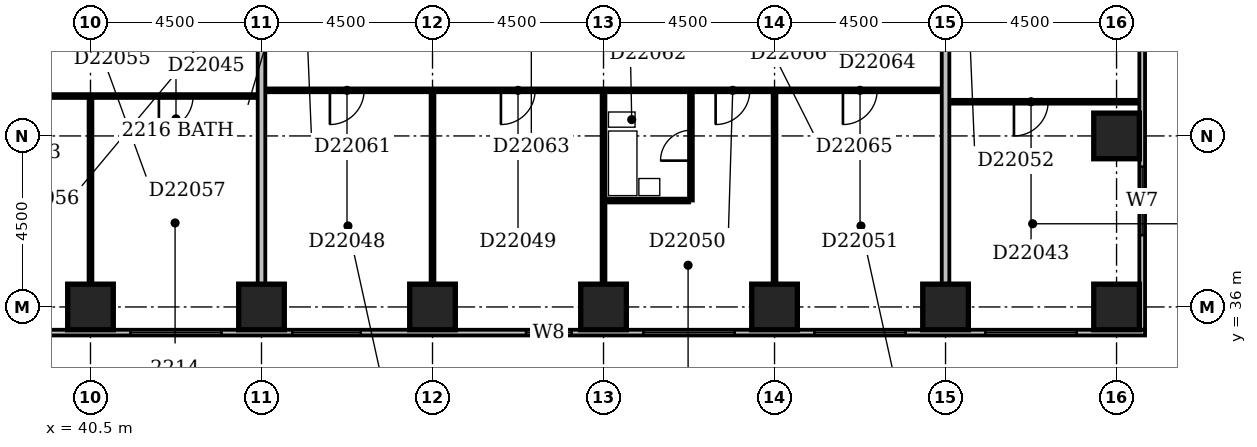
"""IFC4 building model, lengths in metres.
Left out: names, types, materials, properties, quantities, classifications, styles, units other than length and angle.
Written with IfcOpenShell. Run it as: python <this file> out.ifc"""

import sys

from ifc_helpers import new_model, si_unit, direction, frame, frame_2d, origin, origin_2d, place, context, subcontext, project, spatial, rectangle, extrude, element, fill, save


model = new_model("IFC4")
c1 = context("Model", 3, precision=1e-05, world=origin(), true_north=direction((0.0, 1.0)))
c2 = subcontext(c1, "Body", "Model", "MODEL_VIEW")
j1 = project(units=[si_unit("LENGTHUNIT", "METRE"), si_unit("PLANEANGLEUNIT", "RADIAN")], contexts=[c1])
p1 = place(None, origin())
s1 = spatial("IfcSite", under=j1, at=p1, CompositionType="ELEMENT")
p2 = place(p1, origin())
s2 = spatial("IfcBuilding", under=s1, at=p2, CompositionType="ELEMENT")
p3 = place(p2, frame((0.0, 0.0, 90.2)))
s3 = spatial("IfcBuildingStorey", under=s2, at=p3, CompositionType="ELEMENT", Elevation=90.2)
for number, where, z_axis, x_axis in (
    (1, (40.5, 36.0, -0.3), (0.0, 0.0, 1.0), (1.0, 0.0, 0.0)),
    (2, (45.0, 36.0, -0.3), (0.0, 0.0, 1.0), (1.0, 0.0, 0.0)),
    (3, (49.5, 36.0, -0.3), (0.0, 0.0, 1.0), (1.0, 0.0, 0.0)),
    (4, (54.0, 36.0, -0.3), (0.0, 0.0, 1.0), (1.0, 0.0, 0.0)),
    (5, (58.5, 36.0, -0.3), (0.0, 0.0, 1.0), (1.0, 0.0, 0.0)),
    (6, (63.0, 36.0, -0.3), (0.0, 0.0, 1.0), (1.0, 0.0, 0.0)),
    (7, (67.5, 36.0, -0.3), (0.0, 0.0, 1.0), (1.0, 0.0, 0.0)),
    (8, (67.5, 40.5, -0.3), (0.0, 0.0, 1.0), (1.0, 0.0, 0.0)),
):
    element("IfcColumn", number, at=place(p3, frame(where, z_axis=z_axis, x_axis=x_axis)), inside=s3, PredefinedType="COLUMN", context=c2, shape_type="SweptSolid", body=[
        extrude(rectangle(XDim=1.2, YDim=1.2, at=origin_2d()), origin(), (0.0, 0.0, 1.0), 3.6),
    ])
p4 = place(p3, frame((23.1, 35.325, 0.0), z_axis=(0.0, 0.0, 1.0), x_axis=(1.0, 0.0, 0.0)))
e9 = element("IfcWall", 9, at=p4, inside=s3, PredefinedType="STANDARD", context=c2, shape_type="SweptSolid", body=[
    extrude(rectangle(XDim=45.15, YDim=0.15, at=frame_2d((22.575, 0.0))), origin(), (0.0, 0.0, 1.0), 2.7),
])
p5 = place(p4, frame((2.185, 0.0, 0.6)))
e10 = element("IfcOpeningElement", 10, at=p5, cuts=e9, PredefinedType="OPENING", context=c2, shape_type="SweptSolid", body=[
    extrude(rectangle(XDim=0.9, YDim=1.8, at=frame_2d((0.45, 0.9))), frame((0.0, 0.087, 0.0), z_axis=(0.0, -1.0, 0.0), x_axis=(1.0, 0.0, 0.0)), (0.0, 0.0, 1.0), 0.174),
])
p6 = place(p4, frame((4.95, 0.0, 0.6)))
e11 = element("IfcOpeningElement", 11, at=p6, cuts=e9, PredefinedType="OPENING", context=c2, shape_type="SweptSolid", body=[
    extrude(rectangle(XDim=2.4, YDim=1.8, at=frame_2d((1.2, 0.9))), frame((0.0, 0.087, 0.0), z_axis=(0.0, -1.0, 0.0), x_axis=(1.0, 0.0, 0.0)), (0.0, 0.0, 1.0), 0.174),
])
p7 = place(p4, frame((9.45, 0.0, 0.6)))
e12 = element("IfcOpeningElement", 12, at=p7, cuts=e9, PredefinedType="OPENING", context=c2, shape_type="SweptSolid", body=[
    extrude(rectangle(XDim=2.4, YDim=1.8, at=frame_2d((1.2, 0.9))), frame((0.0, 0.087, 0.0), z_axis=(0.0, -1.0, 0.0), x_axis=(1.0, 0.0, 0.0)), (0.0, 0.0, 1.0), 0.174),
])
p8 = place(p4, frame((13.95, 0.0, 0.6)))
e13 = element("IfcOpeningElement", 13, at=p8, cuts=e9, PredefinedType="OPENING", context=c2, shape_type="SweptSolid", body=[
    extrude(rectangle(XDim=2.4, YDim=1.8, at=frame_2d((1.2, 0.9))), frame((0.0, 0.087, 0.0), z_axis=(0.0, -1.0, 0.0), x_axis=(1.0, 0.0, 0.0)), (0.0, 0.0, 1.0), 0.174),
])
p9 = place(p4, frame((18.45, 0.0, 0.6)))
e14 = element("IfcOpeningElement", 14, at=p9, cuts=e9, PredefinedType="OPENING", context=c2, shape_type="SweptSolid", body=[
    extrude(rectangle(XDim=2.4, YDim=1.8, at=frame_2d((1.2, 0.9))), frame((0.0, 0.087, 0.0), z_axis=(0.0, -1.0, 0.0), x_axis=(1.0, 0.0, 0.0)), (0.0, 0.0, 1.0), 0.174),
])
p10 = place(p4, frame((22.71, 0.0, 0.6)))
e15 = element("IfcOpeningElement", 15, at=p10, cuts=e9, PredefinedType="OPENING", context=c2, shape_type="SweptSolid", body=[
    extrude(rectangle(XDim=1.8, YDim=1.8, at=frame_2d((0.9, 0.9))), frame((0.0, 0.087, 0.0), z_axis=(0.0, -1.0, 0.0), x_axis=(1.0, 0.0, 0.0)), (0.0, 0.0, 1.0), 0.174),
])
p11 = place(p4, frame((28.861, 0.0, 0.6)))
e16 = element("IfcOpeningElement", 16, at=p11, cuts=e9, PredefinedType="OPENING", context=c2, shape_type="SweptSolid", body=[
    extrude(rectangle(XDim=1.2, YDim=1.8, at=frame_2d((0.6, 0.9))), frame((0.0, 0.087, 0.0), z_axis=(0.0, -1.0, 0.0), x_axis=(1.0, 0.0, 0.0)), (0.0, 0.0, 1.0), 0.174),
])
p12 = place(p4, frame((31.95, 0.0, 0.6)))
e17 = element("IfcOpeningElement", 17, at=p12, cuts=e9, PredefinedType="OPENING", context=c2, shape_type="SweptSolid", body=[
    extrude(rectangle(XDim=2.4, YDim=1.8, at=frame_2d((1.2, 0.9))), frame((0.0, 0.087, 0.0), z_axis=(0.0, -1.0, 0.0), x_axis=(1.0, 0.0, 0.0)), (0.0, 0.0, 1.0), 0.174),
])
p13 = place(p4, frame((36.45, 0.0, 0.6)))
e18 = element("IfcOpeningElement", 18, at=p13, cuts=e9, PredefinedType="OPENING", context=c2, shape_type="SweptSolid", body=[
    extrude(rectangle(XDim=2.4, YDim=1.8, at=frame_2d((1.2, 0.9))), frame((0.0, 0.087, 0.0), z_axis=(0.0, -1.0, 0.0), x_axis=(1.0, 0.0, 0.0)), (0.0, 0.0, 1.0), 0.174),
])
p14 = place(p4, frame((40.95, 0.0, 0.6)))
e19 = element("IfcOpeningElement", 19, at=p14, cuts=e9, PredefinedType="OPENING", context=c2, shape_type="SweptSolid", body=[
    extrude(rectangle(XDim=2.4, YDim=1.8, at=frame_2d((1.2, 0.9))), frame((0.0, 0.087, 0.0), z_axis=(0.0, -1.0, 0.0), x_axis=(1.0, 0.0, 0.0)), (0.0, 0.0, 1.0), 0.174),
])
p15 = place(p3, frame((68.175, 35.4, 0.0), z_axis=(0.0, 0.0, 1.0), x_axis=(0.0, 1.0, 0.0)))
e20 = element("IfcWall", 20, at=p15, inside=s3, PredefinedType="STANDARD", context=c2, shape_type="SweptSolid", body=[
    extrude(rectangle(XDim=23.85, YDim=0.15, at=frame_2d((11.925, 0.0))), origin(), (0.0, 0.0, 1.0), 2.7),
])
p16 = place(p15, frame((2.49, 0.0, 0.6)))
e21 = element("IfcOpeningElement", 21, at=p16, cuts=e20, PredefinedType="OPENING", context=c2, shape_type="SweptSolid", body=[
    extrude(rectangle(XDim=1.8, YDim=1.8, at=frame_2d((0.9, 0.9))), frame((0.0, 0.087, 0.0), z_axis=(0.0, -1.0, 0.0), x_axis=(1.0, 0.0, 0.0)), (0.0, 0.0, 1.0), 0.174),
])
p17 = place(p3, frame((40.5, 36.6, 0.0), z_axis=(0.0, 0.0, 1.0), x_axis=(0.0, 1.0, 0.0)))
e22 = element("IfcWall", 22, at=p17, inside=s3, PredefinedType="PARTITIONING", context=c2, shape_type="SweptSolid", body=[
    extrude(rectangle(XDim=4.9, YDim=0.1, at=frame_2d((2.45, 0.0))), origin(), (0.0, 0.0, 1.0), 3.3),
])
p18 = place(p3, frame((45.0, 36.6, 0.0), z_axis=(0.0, 0.0, 1.0), x_axis=(0.0, 1.0, 0.0)))
e23 = element("IfcWall", 23, at=p18, inside=s3, PredefinedType="PARTITIONING", context=c2, shape_type="SweptSolid", body=[
    extrude(rectangle(XDim=12.8, YDim=0.2, at=frame_2d((6.4, 0.0))), origin(), (0.0, 0.0, 1.0), 2.6),
])
p19 = place(p3, frame((49.5, 36.6, 0.0), z_axis=(0.0, 0.0, 1.0), x_axis=(0.0, 1.0, 0.0)))
e24 = element("IfcWall", 24, at=p19, inside=s3, PredefinedType="PARTITIONING", context=c2, shape_type="SweptSolid", body=[
    extrude(rectangle(XDim=5.05, YDim=0.1, at=frame_2d((2.525, 0.0))), origin(), (0.0, 0.0, 1.0), 3.3),
])
p20 = place(p3, frame((54.0, 36.6, 0.0), z_axis=(0.0, 0.0, 1.0), x_axis=(0.0, 1.0, 0.0)))
e25 = element("IfcWall", 25, at=p20, inside=s3, PredefinedType="PARTITIONING", context=c2, shape_type="SweptSolid", body=[
    extrude(rectangle(XDim=5.05, YDim=0.1, at=frame_2d((2.525, 0.0))), origin(), (0.0, 0.0, 1.0), 2.6),
])
p21 = place(p3, frame((58.5, 36.6, 0.0), z_axis=(0.0, 0.0, 1.0), x_axis=(0.0, 1.0, 0.0)))
e26 = element("IfcWall", 26, at=p21, inside=s3, PredefinedType="PARTITIONING", context=c2, shape_type="SweptSolid", body=[
    extrude(rectangle(XDim=5.05, YDim=0.1, at=frame_2d((2.525, 0.0))), origin(), (0.0, 0.0, 1.0), 3.3),
])
p22 = place(p3, frame((63.0, 36.6, 0.0), z_axis=(0.0, 0.0, 1.0), x_axis=(0.0, 1.0, 0.0)))
e27 = element("IfcWall", 27, at=p22, inside=s3, PredefinedType="PARTITIONING", context=c2, shape_type="SweptSolid", body=[
    extrude(rectangle(XDim=12.8, YDim=0.2, at=frame_2d((6.4, 0.0))), origin(), (0.0, 0.0, 1.0), 2.4),
])
p23 = place(p3, frame((54.05, 38.8, 0.0), z_axis=(0.0, 0.0, 1.0), x_axis=(1.0, 0.0, 0.0)))
e28 = element("IfcWall", 28, at=p23, inside=s3, PredefinedType="PLUMBINGWALL", context=c2, shape_type="SweptSolid", body=[
    extrude(rectangle(XDim=2.2, YDim=0.1, at=frame_2d((1.1, 0.0))), origin(), (0.0, 0.0, 1.0), 3.3),
])
p24 = place(p3, frame((56.3, 38.8, 0.0), z_axis=(0.0, 0.0, 1.0), x_axis=(0.0, 1.0, 0.0)))
e29 = element("IfcWall", 29, at=p24, inside=s3, PredefinedType="PLUMBINGWALL", context=c2, shape_type="SweptSolid", body=[
    extrude(rectangle(XDim=2.85, YDim=0.1, at=frame_2d((1.425, 0.0))), origin(), (0.0, 0.0, 1.0), 3.3),
])
p25 = place(p24, frame((1.05, 0.0, 0.0)))
e30 = element("IfcOpeningElement", 30, at=p25, cuts=e29, PredefinedType="OPENING", context=c2, shape_type="SweptSolid", body=[
    extrude(rectangle(XDim=0.8, YDim=2.1, at=frame_2d((0.4, 1.05))), frame((0.0, 0.062, 0.0), z_axis=(0.0, -1.0, 0.0), x_axis=(1.0, 0.0, 0.0)), (0.0, 0.0, 1.0), 0.124),
])
p26 = place(p3, frame((63.1, 41.4, 0.0), z_axis=(0.0, 0.0, 1.0), x_axis=(1.0, 0.0, 0.0)))
e31 = element("IfcWall", 31, at=p26, inside=s3, PredefinedType="PARTITIONING", context=c2, shape_type="SweptSolid", body=[
    extrude(rectangle(XDim=5.0, YDim=0.1, at=frame_2d((2.5, 0.0))), origin(), (0.0, 0.0, 1.0), 3.3),
])
p27 = place(p26, frame((1.7, 0.0, 0.0)))
e32 = element("IfcOpeningElement", 32, at=p27, cuts=e31, PredefinedType="OPENING", context=c2, shape_type="SweptSolid", body=[
    extrude(rectangle(XDim=0.9, YDim=2.1, at=frame_2d((0.45, 1.05))), frame((0.0, 0.062, 0.0), z_axis=(0.0, -1.0, 0.0), x_axis=(1.0, 0.0, 0.0)), (0.0, 0.0, 1.0), 0.124),
])
p28 = place(p3, frame((31.6, 41.55, 0.0), z_axis=(0.0, 0.0, 1.0), x_axis=(1.0, 0.0, 0.0)))
e33 = element("IfcWall", 33, at=p28, inside=s3, PredefinedType="PARTITIONING", context=c2, shape_type="SweptSolid", body=[
    extrude(rectangle(XDim=13.3, YDim=0.1, at=frame_2d((6.65, 0.0))), origin(), (0.0, 0.0, 1.0), 3.3),
])
p29 = place(p28, frame((3.9, 0.0, 0.0)))
e34 = element("IfcOpeningElement", 34, at=p29, cuts=e33, PredefinedType="OPENING", context=c2, shape_type="SweptSolid", body=[
    extrude(rectangle(XDim=0.9, YDim=2.1, at=frame_2d((0.45, 1.05))), frame((0.0, 0.062, 0.0), z_axis=(0.0, -1.0, 0.0), x_axis=(1.0, 0.0, 0.0)), (0.0, 0.0, 1.0), 0.124),
])
p30 = place(p28, frame((10.7, 0.0, 0.0)))
e35 = element("IfcOpeningElement", 35, at=p30, cuts=e33, PredefinedType="OPENING", context=c2, shape_type="SweptSolid", body=[
    extrude(rectangle(XDim=0.9, YDim=2.1, at=frame_2d((0.45, 1.05))), frame((0.0, 0.062, 0.0), z_axis=(0.0, -1.0, 0.0), x_axis=(1.0, 0.0, 0.0)), (0.0, 0.0, 1.0), 0.124),
])
p31 = place(p3, frame((45.1, 41.7, 0.0), z_axis=(0.0, 0.0, 1.0), x_axis=(1.0, 0.0, 0.0)))
e36 = element("IfcWall", 36, at=p31, inside=s3, PredefinedType="PARTITIONING", context=c2, shape_type="SweptSolid", body=[
    extrude(rectangle(XDim=17.8, YDim=0.1, at=frame_2d((8.9, 0.0))), origin(), (0.0, 0.0, 1.0), 3.3),
])
p32 = place(p31, frame((1.7, 0.0, 0.0)))
e37 = element("IfcOpeningElement", 37, at=p32, cuts=e36, PredefinedType="OPENING", context=c2, shape_type="SweptSolid", body=[
    extrude(rectangle(XDim=0.9, YDim=2.1, at=frame_2d((0.45, 1.05))), frame((0.0, 0.062, 0.0), z_axis=(0.0, -1.0, 0.0), x_axis=(1.0, 0.0, 0.0)), (0.0, 0.0, 1.0), 0.124),
])
p33 = place(p31, frame((6.2, 0.0, 0.0)))
e38 = element("IfcOpeningElement", 38, at=p33, cuts=e36, PredefinedType="OPENING", context=c2, shape_type="SweptSolid", body=[
    extrude(rectangle(XDim=0.9, YDim=2.1, at=frame_2d((0.45, 1.05))), frame((0.0, 0.062, 0.0), z_axis=(0.0, -1.0, 0.0), x_axis=(1.0, 0.0, 0.0)), (0.0, 0.0, 1.0), 0.124),
])
p34 = place(p31, frame((11.85, 0.0, 0.0)))
e39 = element("IfcOpeningElement", 39, at=p34, cuts=e36, PredefinedType="OPENING", context=c2, shape_type="SweptSolid", body=[
    extrude(rectangle(XDim=0.9, YDim=2.1, at=frame_2d((0.45, 1.05))), frame((0.0, 0.062, 0.0), z_axis=(0.0, -1.0, 0.0), x_axis=(1.0, 0.0, 0.0)), (0.0, 0.0, 1.0), 0.124),
])
p35 = place(p31, frame((15.2, 0.0, 0.0)))
e40 = element("IfcOpeningElement", 40, at=p35, cuts=e36, PredefinedType="OPENING", context=c2, shape_type="SweptSolid", body=[
    extrude(rectangle(XDim=0.9, YDim=2.1, at=frame_2d((0.45, 1.05))), frame((0.0, 0.062, 0.0), z_axis=(0.0, -1.0, 0.0), x_axis=(1.0, 0.0, 0.0)), (0.0, 0.0, 1.0), 0.124),
])
p36 = place(p9, origin())
e41 = element("IfcWindow", 41, at=p36, inside=s3, PartitioningType="SINGLE_PANEL", PredefinedType="WINDOW", context=c2, shape_type="SweptSolid", body=[
    extrude(rectangle(XDim=2.4, YDim=1.8, at=frame_2d((1.2, 0.9))), frame((0.0, 0.03, 0.0), z_axis=(0.0, -1.0, 0.0), x_axis=(1.0, 0.0, 0.0)), (0.0, 0.0, 1.0), 0.06),
])
fill(e14, e41)
p37 = place(p10, origin())
e42 = element("IfcWindow", 42, at=p37, inside=s3, PartitioningType="SINGLE_PANEL", PredefinedType="WINDOW", context=c2, shape_type="SweptSolid", body=[
    extrude(rectangle(XDim=1.8, YDim=1.8, at=frame_2d((0.9, 0.9))), frame((0.0, 0.03, 0.0), z_axis=(0.0, -1.0, 0.0), x_axis=(1.0, 0.0, 0.0)), (0.0, 0.0, 1.0), 0.06),
])
fill(e15, e42)
p38 = place(p11, origin())
e43 = element("IfcWindow", 43, at=p38, inside=s3, PartitioningType="SINGLE_PANEL", PredefinedType="WINDOW", context=c2, shape_type="SweptSolid", body=[
    extrude(rectangle(XDim=1.2, YDim=1.8, at=frame_2d((0.6, 0.9))), frame((0.0, 0.03, 0.0), z_axis=(0.0, -1.0, 0.0), x_axis=(1.0, 0.0, 0.0)), (0.0, 0.0, 1.0), 0.06),
])
fill(e16, e43)
p39 = place(p12, origin())
e44 = element("IfcWindow", 44, at=p39, inside=s3, PartitioningType="SINGLE_PANEL", PredefinedType="WINDOW", context=c2, shape_type="SweptSolid", body=[
    extrude(rectangle(XDim=2.4, YDim=1.8, at=frame_2d((1.2, 0.9))), frame((0.0, 0.03, 0.0), z_axis=(0.0, -1.0, 0.0), x_axis=(1.0, 0.0, 0.0)), (0.0, 0.0, 1.0), 0.06),
])
fill(e17, e44)
p40 = place(p13, origin())
e45 = element("IfcWindow", 45, at=p40, inside=s3, PartitioningType="SINGLE_PANEL", PredefinedType="WINDOW", context=c2, shape_type="SweptSolid", body=[
    extrude(rectangle(XDim=2.4, YDim=1.8, at=frame_2d((1.2, 0.9))), frame((0.0, 0.03, 0.0), z_axis=(0.0, -1.0, 0.0), x_axis=(1.0, 0.0, 0.0)), (0.0, 0.0, 1.0), 0.06),
])
fill(e18, e45)
p41 = place(p14, origin())
e46 = element("IfcWindow", 46, at=p41, inside=s3, PartitioningType="SINGLE_PANEL", PredefinedType="WINDOW", context=c2, shape_type="SweptSolid", body=[
    extrude(rectangle(XDim=2.4, YDim=1.8, at=frame_2d((1.2, 0.9))), frame((0.0, 0.03, 0.0), z_axis=(0.0, -1.0, 0.0), x_axis=(1.0, 0.0, 0.0)), (0.0, 0.0, 1.0), 0.06),
])
fill(e19, e46)
p42 = place(p16, origin())
e47 = element("IfcWindow", 47, at=p42, inside=s3, PartitioningType="SINGLE_PANEL", PredefinedType="WINDOW", context=c2, shape_type="SweptSolid", body=[
    extrude(rectangle(XDim=1.8, YDim=1.8, at=frame_2d((0.9, 0.9))), frame((0.0, 0.03, 0.0), z_axis=(0.0, -1.0, 0.0), x_axis=(1.0, 0.0, 0.0)), (0.0, 0.0, 1.0), 0.06),
])
fill(e21, e47)
p43 = place(p25, origin())
e48 = element("IfcDoor", 48, at=p43, inside=s3, OperationType="SINGLE_SWING_LEFT", PredefinedType="DOOR", context=c2, shape_type="SweptSolid", body=[
    extrude(rectangle(XDim=0.8, YDim=2.1, at=frame_2d((0.4, 1.05))), frame((0.0, 0.025, 0.0), z_axis=(0.0, -1.0, 0.0), x_axis=(1.0, 0.0, 0.0)), (0.0, 0.0, 1.0), 0.05),
])
fill(e30, e48)
p44 = place(p27, frame((0.9, 0.0, 0.0), z_axis=(0.0, 0.0, 1.0), x_axis=(-1.0, 0.0, 0.0)))
e49 = element("IfcDoor", 49, at=p44, inside=s3, OperationType="SINGLE_SWING_RIGHT", PredefinedType="DOOR", context=c2, shape_type="SweptSolid", body=[
    extrude(rectangle(XDim=0.9, YDim=2.1, at=frame_2d((0.45, 1.05))), frame((0.0, 0.025, 0.0), z_axis=(0.0, -1.0, 0.0), x_axis=(1.0, 0.0, 0.0)), (0.0, 0.0, 1.0), 0.05),
])
fill(e32, e49)
p45 = place(p30, frame((0.9, 0.0, 0.0), z_axis=(0.0, 0.0, 1.0), x_axis=(-1.0, 0.0, 0.0)))
e50 = element("IfcDoor", 50, at=p45, inside=s3, OperationType="SINGLE_SWING_RIGHT", PredefinedType="DOOR", context=c2, shape_type="SweptSolid", body=[
    extrude(rectangle(XDim=0.9, YDim=2.1, at=frame_2d((0.45, 1.05))), frame((0.0, 0.025, 0.0), z_axis=(0.0, -1.0, 0.0), x_axis=(1.0, 0.0, 0.0)), (0.0, 0.0, 1.0), 0.05),
])
fill(e35, e50)
p46 = place(p32, frame((0.9, 0.0, 0.0), z_axis=(0.0, 0.0, 1.0), x_axis=(-1.0, 0.0, 0.0)))
e51 = element("IfcDoor", 51, at=p46, inside=s3, OperationType="SINGLE_SWING_RIGHT", PredefinedType="DOOR", context=c2, shape_type="SweptSolid", body=[
    extrude(rectangle(XDim=0.9, YDim=2.1, at=frame_2d((0.45, 1.05))), frame((0.0, 0.025, 0.0), z_axis=(0.0, -1.0, 0.0), x_axis=(1.0, 0.0, 0.0)), (0.0, 0.0, 1.0), 0.05),
])
fill(e37, e51)
p47 = place(p33, frame((0.9, 0.0, 0.0), z_axis=(0.0, 0.0, 1.0), x_axis=(-1.0, 0.0, 0.0)))
e52 = element("IfcDoor", 52, at=p47, inside=s3, OperationType="SINGLE_SWING_RIGHT", PredefinedType="DOOR", context=c2, shape_type="SweptSolid", body=[
    extrude(rectangle(XDim=0.9, YDim=2.1, at=frame_2d((0.45, 1.05))), frame((0.0, 0.025, 0.0), z_axis=(0.0, -1.0, 0.0), x_axis=(1.0, 0.0, 0.0)), (0.0, 0.0, 1.0), 0.05),
])
fill(e38, e52)
p48 = place(p34, frame((0.9, 0.0, 0.0), z_axis=(0.0, 0.0, 1.0), x_axis=(-1.0, 0.0, 0.0)))
e53 = element("IfcDoor", 53, at=p48, inside=s3, OperationType="SINGLE_SWING_RIGHT", PredefinedType="DOOR", context=c2, shape_type="SweptSolid", body=[
    extrude(rectangle(XDim=0.9, YDim=2.1, at=frame_2d((0.45, 1.05))), frame((0.0, 0.025, 0.0), z_axis=(0.0, -1.0, 0.0), x_axis=(1.0, 0.0, 0.0)), (0.0, 0.0, 1.0), 0.05),
])
fill(e39, e53)
p49 = place(p35, frame((0.9, 0.0, 0.0), z_axis=(0.0, 0.0, 1.0), x_axis=(-1.0, 0.0, 0.0)))
e54 = element("IfcDoor", 54, at=p49, inside=s3, OperationType="SINGLE_SWING_RIGHT", PredefinedType="DOOR", context=c2, shape_type="SweptSolid", body=[
    extrude(rectangle(XDim=0.9, YDim=2.1, at=frame_2d((0.45, 1.05))), frame((0.0, 0.025, 0.0), z_axis=(0.0, -1.0, 0.0), x_axis=(1.0, 0.0, 0.0)), (0.0, 0.0, 1.0), 0.05),
])
fill(e40, e54)
save(model, sys.argv[1])
